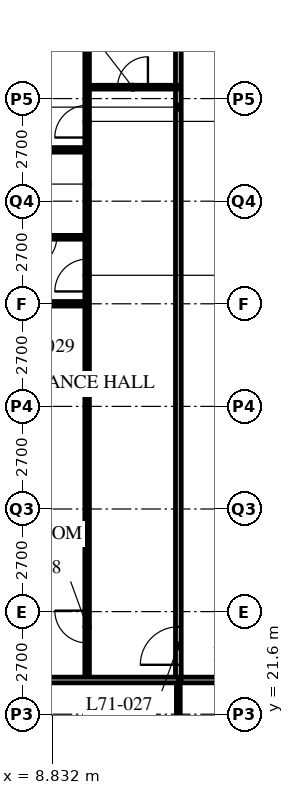
"""IFC4 building model, lengths in metres.
Left out: names, types, materials, properties, quantities, classifications, styles, units other than length and angle.
Written with IfcOpenShell. Run it as: python <this file> out.ifc"""

import sys

from ifc_helpers import new_model, si_unit, direction, frame, frame_2d, origin, place, context, subcontext, project, spatial, rectangle, extrude, element, fill, save


model = new_model("IFC4")
c1 = context("Model", 3, precision=1e-05, world=origin(), true_north=direction((0.0, 1.0)))
c2 = subcontext(c1, "Body", "Model", "MODEL_VIEW")
j1 = project(units=[si_unit("LENGTHUNIT", "METRE"), si_unit("PLANEANGLEUNIT", "RADIAN")], contexts=[c1])
p1 = place(None, origin())
s1 = spatial("IfcSite", under=j1, at=p1, CompositionType="ELEMENT")
p2 = place(p1, origin())
s2 = spatial("IfcBuilding", under=s1, at=p2, CompositionType="ELEMENT")
p3 = place(p2, frame((0.0, 0.0, 277.5)))
s3 = spatial("IfcBuildingStorey", under=s2, at=p3, CompositionType="ELEMENT", Elevation=277.5)
p4 = place(p3, frame((12.15, 22.5, 0.0), z_axis=(0.0, 0.0, 1.0), x_axis=(1.0, 0.0, 0.0)))
e1 = element("IfcWall", 1, at=p4, inside=s3, PredefinedType="PARTITIONING", context=c2, shape_type="SweptSolid", body=[
    extrude(rectangle(XDim=24.3, YDim=0.15, at=frame_2d((12.15, 0.0))), origin(), (0.0, 0.0, 1.0), 3.69),
])
p5 = place(p4, frame((4.45, 0.0, 0.0)))
e2 = element("IfcOpeningElement", 2, at=p5, cuts=e1, PredefinedType="OPENING", context=c2, shape_type="SweptSolid", body=[
    extrude(rectangle(XDim=1.0, YDim=2.1, at=frame_2d((0.5, 1.05))), frame((0.0, 0.085, 0.0), z_axis=(0.0, -1.0, 0.0), x_axis=(1.0, 0.0, 0.0)), (0.0, 0.0, 1.0), 0.17),
])
p6 = place(p4, frame((12.55, 0.0, 0.0)))
e3 = element("IfcOpeningElement", 3, at=p6, cuts=e1, PredefinedType="OPENING", context=c2, shape_type="SweptSolid", body=[
    extrude(rectangle(XDim=1.0, YDim=2.1, at=frame_2d((0.5, 1.05))), frame((0.0, 0.085, 0.0), z_axis=(0.0, -1.0, 0.0), x_axis=(1.0, 0.0, 0.0)), (0.0, 0.0, 1.0), 0.17),
])
p7 = place(p4, frame((2.625, 0.0, 0.0)))
e4 = element("IfcOpeningElement", 4, at=p7, cuts=e1, PredefinedType="OPENING", context=c2, shape_type="SweptSolid", body=[
    extrude(rectangle(XDim=1.0, YDim=2.1, at=frame_2d((0.5, 1.05))), frame((0.0, 0.085, 0.0), z_axis=(0.0, -1.0, 0.0), x_axis=(1.0, 0.0, 0.0)), (0.0, 0.0, 1.0), 0.17),
])
p8 = place(p3, frame((12.15, 22.5, 0.0), z_axis=(0.0, 0.0, 1.0), x_axis=(0.0, 1.0, 0.0)))
e5 = element("IfcWall", 5, at=p8, inside=s3, PredefinedType="PARTITIONING", context=c2, shape_type="SweptSolid", body=[
    extrude(rectangle(XDim=30.15, YDim=0.15, at=frame_2d((15.075, 0.0))), origin(), (0.0, 0.0, 1.0), 3.69),
])
p9 = place(p8, frame((0.4, 0.0, 0.0)))
e6 = element("IfcOpeningElement", 6, at=p9, cuts=e5, PredefinedType="OPENING", context=c2, shape_type="SweptSolid", body=[
    extrude(rectangle(XDim=1.0, YDim=2.1, at=frame_2d((0.5, 1.05))), frame((0.0, 0.085, 0.0), z_axis=(0.0, -1.0, 0.0), x_axis=(1.0, 0.0, 0.0)), (0.0, 0.0, 1.0), 0.17),
])
p10 = place(p8, frame((18.4, 0.0, 0.0)))
e7 = element("IfcOpeningElement", 7, at=p10, cuts=e5, PredefinedType="OPENING", context=c2, shape_type="SweptSolid", body=[
    extrude(rectangle(XDim=1.0, YDim=2.1, at=frame_2d((0.5, 1.05))), frame((0.0, 0.085, 0.0), z_axis=(0.0, -1.0, 0.0), x_axis=(1.0, 0.0, 0.0)), (0.0, 0.0, 1.0), 0.17),
])
p11 = place(p8, frame((28.45, 0.0, 0.0)))
e8 = element("IfcOpeningElement", 8, at=p11, cuts=e5, PredefinedType="OPENING", context=c2, shape_type="SweptSolid", body=[
    extrude(rectangle(XDim=1.0, YDim=2.1, at=frame_2d((0.5, 1.05))), frame((0.0, 0.085, 0.0), z_axis=(0.0, -1.0, 0.0), x_axis=(1.0, 0.0, 0.0)), (0.0, 0.0, 1.0), 0.17),
])
p12 = place(p3, frame((9.75, 22.5, 0.0), z_axis=(0.0, 0.0, 1.0), x_axis=(0.0, 1.0, 0.0)))
e9 = element("IfcWall", 9, at=p12, inside=s3, PredefinedType="PARTITIONING", context=c2, shape_type="SweptSolid", body=[
    extrude(rectangle(XDim=26.1, YDim=0.12, at=frame_2d((13.05, 0.0))), origin(), (0.0, 0.0, 1.0), 3.69),
])
p13 = place(p12, frame((0.975, 0.0, 0.0)))
e10 = element("IfcOpeningElement", 10, at=p13, cuts=e9, PredefinedType="OPENING", context=c2, shape_type="SweptSolid", body=[
    extrude(rectangle(XDim=0.85, YDim=2.1, at=frame_2d((0.425, 1.05))), frame((0.0, 0.07, 0.0), z_axis=(0.0, -1.0, 0.0), x_axis=(1.0, 0.0, 0.0)), (0.0, 0.0, 1.0), 0.14),
])
p14 = place(p12, frame((10.225, 0.0, 0.0)))
e11 = element("IfcOpeningElement", 11, at=p14, cuts=e9, PredefinedType="OPENING", context=c2, shape_type="SweptSolid", body=[
    extrude(rectangle(XDim=0.85, YDim=2.1, at=frame_2d((0.425, 1.05))), frame((0.0, 0.07, 0.0), z_axis=(0.0, -1.0, 0.0), x_axis=(1.0, 0.0, 0.0)), (0.0, 0.0, 1.0), 0.14),
])
p15 = place(p12, frame((14.275, 0.0, 0.0)))
e12 = element("IfcOpeningElement", 12, at=p15, cuts=e9, PredefinedType="OPENING", context=c2, shape_type="SweptSolid", body=[
    extrude(rectangle(XDim=0.85, YDim=2.1, at=frame_2d((0.425, 1.05))), frame((0.0, 0.07, 0.0), z_axis=(0.0, -1.0, 0.0), x_axis=(1.0, 0.0, 0.0)), (0.0, 0.0, 1.0), 0.14),
])
p16 = place(p12, frame((18.975, 0.0, 0.0)))
e13 = element("IfcOpeningElement", 13, at=p16, cuts=e9, PredefinedType="OPENING", context=c2, shape_type="SweptSolid", body=[
    extrude(rectangle(XDim=0.85, YDim=2.1, at=frame_2d((0.425, 1.05))), frame((0.0, 0.07, 0.0), z_axis=(0.0, -1.0, 0.0), x_axis=(1.0, 0.0, 0.0)), (0.0, 0.0, 1.0), 0.14),
])
p17 = place(p12, frame((22.375, 0.0, 0.0)))
e14 = element("IfcOpeningElement", 14, at=p17, cuts=e9, PredefinedType="OPENING", context=c2, shape_type="SweptSolid", body=[
    extrude(rectangle(XDim=0.85, YDim=2.1, at=frame_2d((0.425, 1.05))), frame((0.0, 0.07, 0.0), z_axis=(0.0, -1.0, 0.0), x_axis=(1.0, 0.0, 0.0)), (0.0, 0.0, 1.0), 0.14),
])
p18 = place(p3, frame((12.15, 38.1, 0.0), z_axis=(0.0, 0.0, 1.0), x_axis=(-1.0, 0.0, 0.0)))
e15 = element("IfcWall", 15, at=p18, inside=s3, PredefinedType="PARTITIONING", context=c2, shape_type="SweptSolid", body=[
    extrude(rectangle(XDim=2.4, YDim=0.1, at=frame_2d((1.2, 0.0))), origin(), (0.0, 0.0, 1.0), 3.69),
])
p19 = place(p18, frame((0.8, 0.0, 0.0)))
e16 = element("IfcOpeningElement", 16, at=p19, cuts=e15, PredefinedType="OPENING", context=c2, shape_type="SweptSolid", body=[
    extrude(rectangle(XDim=0.8, YDim=2.1, at=frame_2d((0.4, 1.05))), frame((0.0, 0.06, 0.0), z_axis=(0.0, -1.0, 0.0), x_axis=(1.0, 0.0, 0.0)), (0.0, 0.0, 1.0), 0.12),
])
p20 = place(p3, frame((9.75, 34.15, 0.0), z_axis=(0.0, 0.0, 1.0), x_axis=(-1.0, 0.0, 0.0)))
e17 = element("IfcWall", 17, at=p20, inside=s3, PredefinedType="PARTITIONING", context=c2, shape_type="SweptSolid", body=[
    extrude(rectangle(XDim=2.4, YDim=0.1, at=frame_2d((1.2, 0.0))), origin(), (0.0, 0.0, 1.0), 3.69),
])
p21 = place(p20, frame((0.8, 0.0, 0.0)))
e18 = element("IfcOpeningElement", 18, at=p21, cuts=e17, PredefinedType="OPENING", context=c2, shape_type="SweptSolid", body=[
    extrude(rectangle(XDim=0.8, YDim=2.1, at=frame_2d((0.4, 1.05))), frame((0.0, 0.06, 0.0), z_axis=(0.0, -1.0, 0.0), x_axis=(1.0, 0.0, 0.0)), (0.0, 0.0, 1.0), 0.12),
])
p22 = place(p3, frame((9.75, 32.4, 0.0), z_axis=(0.0, 0.0, 1.0), x_axis=(-1.0, 0.0, 0.0)))
e19 = element("IfcWall", 19, at=p22, inside=s3, PredefinedType="PARTITIONING", context=c2, shape_type="SweptSolid", body=[
    extrude(rectangle(XDim=9.45, YDim=0.12, at=frame_2d((4.725, 0.0))), origin(), (0.0, 0.0, 1.0), 3.078),
])
p23 = place(p3, frame((9.75, 36.45, 0.0), z_axis=(0.0, 0.0, 1.0), x_axis=(-1.0, 0.0, 0.0)))
e20 = element("IfcWall", 20, at=p23, inside=s3, PredefinedType="PARTITIONING", context=c2, shape_type="SweptSolid", body=[
    extrude(rectangle(XDim=9.45, YDim=0.12, at=frame_2d((4.725, 0.0))), origin(), (0.0, 0.0, 1.0), 3.69),
])
p24 = place(p3, frame((12.15, 22.5, 0.0), z_axis=(0.0, 0.0, 1.0), x_axis=(0.0, -1.0, 0.0)))
e21 = element("IfcWall", 21, at=p24, inside=s3, PredefinedType="PARTITIONING", context=c2, shape_type="SweptSolid", body=[
    extrude(rectangle(XDim=2.4, YDim=0.1, at=frame_2d((1.2, 0.0))), origin(), (0.0, 0.0, 1.0), 3.69),
])
p25 = place(p3, frame((4.35, 22.5, 0.0), z_axis=(0.0, 0.0, 1.0), x_axis=(1.0, 0.0, 0.0)))
e22 = element("IfcWall", 22, at=p25, inside=s3, PredefinedType="PARTITIONING", context=c2, shape_type="SweptSolid", body=[
    extrude(rectangle(XDim=7.8, YDim=0.15, at=frame_2d((3.9, 0.0))), origin(), (0.0, 0.0, 1.0), 3.69),
])
p26 = place(p19, origin())
e23 = element("IfcDoor", 23, at=p26, inside=s3, OperationType="SINGLE_SWING_RIGHT", PredefinedType="DOOR", context=c2, shape_type="SweptSolid", body=[
    extrude(rectangle(XDim=0.8, YDim=2.1, at=frame_2d((0.4, 1.05))), frame((0.0, 0.025, 0.0), z_axis=(0.0, -1.0, 0.0), x_axis=(1.0, 0.0, 0.0)), (0.0, 0.0, 1.0), 0.05),
])
fill(e16, e23)
p27 = place(p9, origin())
e24 = element("IfcDoor", 24, at=p27, inside=s3, OperationType="SINGLE_SWING_LEFT", PredefinedType="DOOR", context=c2, shape_type="SweptSolid", body=[
    extrude(rectangle(XDim=1.0, YDim=2.1, at=frame_2d((0.5, 1.05))), frame((0.0, 0.025, 0.0), z_axis=(0.0, -1.0, 0.0), x_axis=(1.0, 0.0, 0.0)), (0.0, 0.0, 1.0), 0.05),
])
fill(e6, e24)
p28 = place(p13, origin())
e25 = element("IfcDoor", 25, at=p28, inside=s3, OperationType="SINGLE_SWING_RIGHT", PredefinedType="DOOR", context=c2, shape_type="SweptSolid", body=[
    extrude(rectangle(XDim=0.85, YDim=2.1, at=frame_2d((0.425, 1.05))), frame((0.0, 0.025, 0.0), z_axis=(0.0, -1.0, 0.0), x_axis=(1.0, 0.0, 0.0)), (0.0, 0.0, 1.0), 0.05),
])
fill(e10, e25)
p29 = place(p21, origin())
e26 = element("IfcDoor", 26, at=p29, inside=s3, OperationType="SINGLE_SWING_RIGHT", PredefinedType="DOOR", context=c2, shape_type="SweptSolid", body=[
    extrude(rectangle(XDim=0.8, YDim=2.1, at=frame_2d((0.4, 1.05))), frame((0.0, 0.025, 0.0), z_axis=(0.0, -1.0, 0.0), x_axis=(1.0, 0.0, 0.0)), (0.0, 0.0, 1.0), 0.05),
])
fill(e18, e26)
p30 = place(p14, origin())
e27 = element("IfcDoor", 27, at=p30, inside=s3, OperationType="SINGLE_SWING_LEFT", PredefinedType="DOOR", context=c2, shape_type="SweptSolid", body=[
    extrude(rectangle(XDim=0.85, YDim=2.1, at=frame_2d((0.425, 1.05))), frame((0.0, 0.025, 0.0), z_axis=(0.0, -1.0, 0.0), x_axis=(1.0, 0.0, 0.0)), (0.0, 0.0, 1.0), 0.05),
])
fill(e11, e27)
p31 = place(p15, origin())
e28 = element("IfcDoor", 28, at=p31, inside=s3, OperationType="SINGLE_SWING_LEFT", PredefinedType="DOOR", context=c2, shape_type="SweptSolid", body=[
    extrude(rectangle(XDim=0.85, YDim=2.1, at=frame_2d((0.425, 1.05))), frame((0.0, 0.025, 0.0), z_axis=(0.0, -1.0, 0.0), x_axis=(1.0, 0.0, 0.0)), (0.0, 0.0, 1.0), 0.05),
])
fill(e12, e28)
save(model, sys.argv[1])
